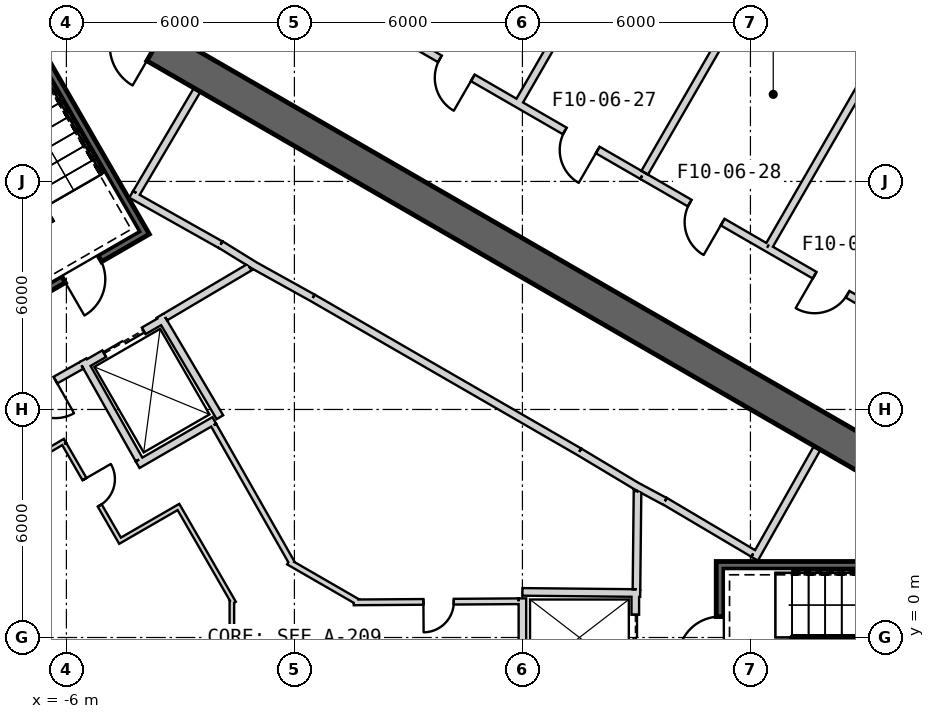
"""IFC4 building model, lengths in metres.
Left out: names, types, materials, properties, quantities, classifications, styles, units other than length and angle.
Written with IfcOpenShell. Run it as: python <this file> out.ifc"""

import sys

from ifc_helpers import new_model, si_unit, direction, frame, frame_2d, origin, place, context, subcontext, project, spatial, rectangle, extrude, element, fill, save


model = new_model("IFC4")
c1 = context("Model", 3, precision=1e-05, world=origin(), true_north=direction((0.0, 1.0)))
c2 = subcontext(c1, "Body", "Model", "MODEL_VIEW")
j1 = project(units=[si_unit("LENGTHUNIT", "METRE"), si_unit("PLANEANGLEUNIT", "RADIAN")], contexts=[c1])
p1 = place(None, origin())
s1 = spatial("IfcSite", under=j1, at=p1, CompositionType="ELEMENT")
p2 = place(p1, origin())
s2 = spatial("IfcBuilding", under=s1, at=p2, CompositionType="ELEMENT")
p3 = place(p2, frame((0.0, 0.0, 39.5)))
s3 = spatial("IfcBuildingStorey", under=s2, at=p3, CompositionType="ELEMENT", Elevation=39.5)
p4 = place(p3, frame((19.475, 2.208, 0.0), z_axis=(0.0, 0.0, 1.0), x_axis=(-0.866028369851, 0.499994862586, 0.0)))
e1 = element("IfcWall", 1, at=p4, inside=s3, PredefinedType="SHEAR", context=c2, shape_type="SweptSolid", body=[
    extrude(rectangle(XDim=31.523, YDim=0.9, at=frame_2d((15.762, 0.0))), origin(), (0.0, 0.0, 1.0), 6.0),
])
p5 = place(p4, frame((3.612, 0.0, 0.0)))
e2 = element("IfcOpeningElement", 2, at=p5, cuts=e1, PredefinedType="OPENING", context=c2, shape_type="SweptSolid", body=[
    extrude(rectangle(XDim=1.2, YDim=2.4, at=frame_2d((0.6, 1.2))), frame((0.0, 0.46, 0.0), z_axis=(0.0, -1.0, 0.0), x_axis=(1.0, 0.0, 0.0)), (0.0, 0.0, 1.0), 0.92),
])
p6 = place(p4, frame((26.712, 0.0, 0.0)))
e3 = element("IfcOpeningElement", 3, at=p6, cuts=e1, PredefinedType="OPENING", context=c2, shape_type="SweptSolid", body=[
    extrude(rectangle(XDim=1.2, YDim=2.4, at=frame_2d((0.6, 1.2))), frame((0.0, 0.46, 0.0), z_axis=(0.0, -1.0, 0.0), x_axis=(1.0, 0.0, 0.0)), (0.0, 0.0, 1.0), 0.92),
])
p7 = place(p3, frame((30.969, 12.269, 0.0), z_axis=(0.0, 0.0, 1.0), x_axis=(-0.866060590604, 0.499939049688, 0.0)))
e4 = element("IfcWall", 4, at=p7, inside=s3, PredefinedType="SOLIDWALL", context=c2, shape_type="SweptSolid", body=[
    extrude(rectangle(XDim=41.371, YDim=0.24, at=frame_2d((20.686, 0.0))), origin(), (0.0, 0.0, 1.0), 5.7),
])
p8 = place(p3, frame((7.497, 4.886, 0.0), z_axis=(0.0, 0.0, 1.0), x_axis=(-0.866030989016, 0.499990325971, 0.0)))
e5 = element("IfcWall", 5, at=p8, inside=s3, PredefinedType="PLUMBINGWALL", context=c2, shape_type="SweptSolid", body=[
    extrude(rectangle(XDim=8.1, YDim=0.2, at=frame_2d((4.05, 0.0))), origin(), (0.0, 0.0, 1.0), 5.7),
])
p9 = place(p3, frame((12.11, 2.073, 0.0), z_axis=(0.0, 0.0, 1.0), x_axis=(0.49196600604, 0.870614408852, 0.0)))
e6 = element("IfcWall", 6, at=p9, inside=s3, PredefinedType="PLUMBINGWALL", context=c2, shape_type="SweptSolid", body=[
    extrude(rectangle(XDim=3.35, YDim=0.2, at=frame_2d((1.675, 0.0))), origin(), (0.0, 0.0, 1.0), 5.7),
])
p10 = place(p3, frame((12.073, 2.211, 0.0), z_axis=(0.0, 0.0, 1.0), x_axis=(-0.860438357912, 0.509554542943, 0.0)))
e7 = element("IfcWall", 7, at=p10, inside=s3, PredefinedType="PLUMBINGWALL", context=c2, shape_type="SweptSolid", body=[
    extrude(rectangle(XDim=2.7, YDim=0.2, at=frame_2d((1.35, 0.0))), origin(), (0.0, 0.0, 1.0), 5.7),
])
p11 = place(p3, frame((9.748, 3.583, 0.0), z_axis=(0.0, 0.0, 1.0), x_axis=(-0.880917147855, 0.473270513147, 0.0)))
e8 = element("IfcWall", 8, at=p11, inside=s3, PredefinedType="PLUMBINGWALL", context=c2, shape_type="SweptSolid", body=[
    extrude(rectangle(XDim=0.878, YDim=0.2, at=frame_2d((0.439, 0.0))), origin(), (0.0, 0.0, 1.0), 5.7),
])
p12 = place(p3, frame((9.079, 3.937, 0.0), z_axis=(0.0, 0.0, 1.0), x_axis=(-0.857516281273, 0.51445682749, 0.0)))
e9 = element("IfcWall", 9, at=p12, inside=s3, PredefinedType="PLUMBINGWALL", context=c2, shape_type="SweptSolid", body=[
    extrude(rectangle(XDim=1.845, YDim=0.2, at=frame_2d((0.922, 0.0))), origin(), (0.0, 0.0, 1.0), 5.7),
])
p13 = place(p3, frame((-1.941, 10.339, 0.0), z_axis=(0.0, 0.0, 1.0), x_axis=(0.850216889117, -0.526432561171, 0.0)))
e10 = element("IfcWall", 10, at=p13, inside=s3, PredefinedType="PLUMBINGWALL", context=c2, shape_type="SweptSolid", body=[
    extrude(rectangle(XDim=1.078, YDim=0.2, at=frame_2d((0.539, 0.0))), origin(), (0.0, 0.0, 1.0), 5.7),
])
p14 = place(p3, frame((0.483, 8.936, 0.0), z_axis=(0.0, 0.0, 1.0), x_axis=(-0.874269620932, 0.485440655401, 0.0)))
e11 = element("IfcWall", 11, at=p14, inside=s3, PredefinedType="PLUMBINGWALL", context=c2, shape_type="SweptSolid", body=[
    extrude(rectangle(XDim=1.845, YDim=0.2, at=frame_2d((0.922, 0.0))), origin(), (0.0, 0.0, 1.0), 5.7),
])
p15 = place(p3, frame((-4.296, 11.659, 0.0), z_axis=(0.0, 0.0, 1.0), x_axis=(0.871534483978, -0.490334215854, 0.0)))
e12 = element("IfcWall", 12, at=p15, inside=s3, PredefinedType="PLUMBINGWALL", context=c2, shape_type="SweptSolid", body=[
    extrude(rectangle(XDim=2.7, YDim=0.2, at=frame_2d((1.35, 0.0))), origin(), (0.0, 0.0, 1.0), 5.7),
])
p16 = place(p3, frame((-4.158, 11.696, 0.0), z_axis=(0.0, 0.0, 1.0), x_axis=(0.508018930956, 0.861345903683, 0.0)))
e13 = element("IfcWall", 13, at=p16, inside=s3, PredefinedType="PLUMBINGWALL", context=c2, shape_type="SweptSolid", body=[
    extrude(rectangle(XDim=3.15, YDim=0.2, at=frame_2d((1.575, 0.0))), origin(), (0.0, 0.0, 1.0), 5.7),
])
p17 = place(p3, frame((19.2, 1.9, -0.35), z_axis=(0.0, 0.0, 1.0), x_axis=(-1.0, 0.0, 0.0)))
e14 = element("IfcWall", 14, at=p17, inside=s3, PredefinedType="SHEAR", context=c2, shape_type="SweptSolid", body=[
    extrude(rectangle(XDim=8.1, YDim=0.2, at=frame_2d((4.05, 0.0))), origin(), (0.0, 0.0, 1.0), 6.05),
])
p18 = place(p3, frame((11.2, -1.8, -0.35), z_axis=(0.0, 0.0, 1.0), x_axis=(0.0, 1.0, 0.0)))
e15 = element("IfcWall", 15, at=p18, inside=s3, PredefinedType="SHEAR", context=c2, shape_type="SweptSolid", body=[
    extrude(rectangle(XDim=3.6, YDim=0.2, at=frame_2d((1.8, 0.0))), origin(), (0.0, 0.0, 1.0), 6.05),
])
p19 = place(p18, frame((1.25, 0.0, 0.35)))
e16 = element("IfcOpeningElement", 16, at=p19, cuts=e15, PredefinedType="OPENING", context=c2, shape_type="SweptSolid", body=[
    extrude(rectangle(XDim=1.1, YDim=2.1, at=frame_2d((0.55, 1.05))), frame((0.0, 0.11, 0.0), z_axis=(0.0, -1.0, 0.0), x_axis=(1.0, 0.0, 0.0)), (0.0, 0.0, 1.0), 0.22),
])
p20 = place(p3, frame((8.97, 1.2, 0.0), z_axis=(0.0, 0.0, 1.0), x_axis=(0.0, -1.0, 0.0)))
e17 = element("IfcWall", 17, at=p20, inside=s3, PredefinedType="PLUMBINGWALL", context=c2, shape_type="SweptSolid", body=[
    extrude(rectangle(XDim=2.4, YDim=0.2, at=frame_2d((1.2, 0.0))), origin(), (0.0, 0.0, 1.0), 5.7),
])
p21 = place(p20, frame((0.6, 0.0, 0.0)))
e18 = element("IfcOpeningElement", 18, at=p21, cuts=e17, PredefinedType="OPENING", context=c2, shape_type="SweptSolid", body=[
    extrude(rectangle(XDim=1.2, YDim=2.4, at=frame_2d((0.6, 1.2))), frame((0.0, 0.11, 0.0), z_axis=(0.0, -1.0, 0.0), x_axis=(1.0, 0.0, 0.0)), (0.0, 0.0, 1.0), 0.22),
])
p22 = place(p3, frame((6.0, 1.2, 0.0), z_axis=(0.0, 0.0, 1.0), x_axis=(0.999949988, -0.010001074852, 0.0)))
e19 = element("IfcWall", 19, at=p22, inside=s3, PredefinedType="PLUMBINGWALL", context=c2, shape_type="SweptSolid", body=[
    extrude(rectangle(XDim=3.1, YDim=0.2, at=frame_2d((1.55, 0.0))), origin(), (0.0, 0.0, 1.0), 5.7),
])
p23 = place(p3, frame((6.0, -1.1, 0.0), z_axis=(0.0, 0.0, 1.0), x_axis=(0.0, 1.0, 0.0)))
e20 = element("IfcWall", 20, at=p23, inside=s3, PredefinedType="PLUMBINGWALL", context=c2, shape_type="SweptSolid", body=[
    extrude(rectangle(XDim=2.13, YDim=0.2, at=frame_2d((1.065, 0.0))), origin(), (0.0, 0.0, 1.0), 5.7),
])
p24 = place(p3, frame((-7.854, 17.405, -0.35), z_axis=(0.0, 0.0, 1.0), x_axis=(0.499997992926, -0.866026562566, 0.0)))
e21 = element("IfcWall", 21, at=p24, inside=s3, PredefinedType="SHEAR", context=c2, shape_type="SweptSolid", body=[
    extrude(rectangle(XDim=7.9, YDim=0.2, at=frame_2d((3.95, 0.0))), origin(), (0.0, 0.0, 1.0), 6.05),
])
p25 = place(p3, frame((-7.159, 8.8, -0.35), z_axis=(0.0, 0.0, 1.0), x_axis=(0.866047807691, 0.499961193289, 0.0)))
e22 = element("IfcWall", 22, at=p25, inside=s3, PredefinedType="SHEAR", context=c2, shape_type="SweptSolid", body=[
    extrude(rectangle(XDim=3.6, YDim=0.2, at=frame_2d((1.8, 0.0))), origin(), (0.0, 0.0, 1.0), 6.05),
])
p26 = place(p25, frame((1.25, 0.0, 0.35)))
e23 = element("IfcOpeningElement", 23, at=p26, cuts=e22, PredefinedType="OPENING", context=c2, shape_type="SweptSolid", body=[
    extrude(rectangle(XDim=1.1, YDim=2.1, at=frame_2d((0.55, 1.05))), frame((0.0, 0.11, 0.0), z_axis=(0.0, -1.0, 0.0), x_axis=(1.0, 0.0, 0.0)), (0.0, 0.0, 1.0), 0.22),
])
p27 = place(p3, frame((-5.524, 7.168, 0.0), z_axis=(0.0, 0.0, 1.0), x_axis=(0.866024647952, 0.500001309137, 0.0)))
e24 = element("IfcWall", 24, at=p27, inside=s3, PredefinedType="PLUMBINGWALL", context=c2, shape_type="SweptSolid", body=[
    extrude(rectangle(XDim=2.4, YDim=0.2, at=frame_2d((1.2, 0.0))), origin(), (0.0, 0.0, 1.0), 5.7),
])
p28 = place(p27, frame((0.6, 0.0, 0.0)))
e25 = element("IfcOpeningElement", 25, at=p28, cuts=e24, PredefinedType="OPENING", context=c2, shape_type="SweptSolid", body=[
    extrude(rectangle(XDim=1.2, YDim=2.4, at=frame_2d((0.6, 1.2))), frame((0.0, 0.11, 0.0), z_axis=(0.0, -1.0, 0.0), x_axis=(1.0, 0.0, 0.0)), (0.0, 0.0, 1.0), 0.22),
])
p29 = place(p3, frame((-3.538, 8.465, 0.0), z_axis=(0.0, 0.0, 1.0), x_axis=(0.508647062354, -0.860975125052, 0.0)))
e26 = element("IfcWall", 26, at=p29, inside=s3, PredefinedType="PLUMBINGWALL", context=c2, shape_type="SweptSolid", body=[
    extrude(rectangle(XDim=3.1, YDim=0.2, at=frame_2d((1.55, 0.0))), origin(), (0.0, 0.0, 1.0), 5.7),
])
p30 = place(p3, frame((-2.108, 5.711, 0.0), z_axis=(0.0, 0.0, 1.0), x_axis=(-0.866009305107, -0.50002788269, 0.0)))
e27 = element("IfcWall", 27, at=p30, inside=s3, PredefinedType="PLUMBINGWALL", context=c2, shape_type="SweptSolid", body=[
    extrude(rectangle(XDim=2.329, YDim=0.2, at=frame_2d((1.165, 0.0))), origin(), (0.0, 0.0, 1.0), 5.7),
])
p31 = place(p3, frame((-5.562, 7.296, 0.0), z_axis=(0.0, 0.0, 1.0), x_axis=(0.49134651263, -0.870964180966, 0.0)))
e28 = element("IfcWall", 28, at=p31, inside=s3, PredefinedType="PLUMBINGWALL", context=c2, shape_type="SweptSolid", body=[
    extrude(rectangle(XDim=3.0, YDim=0.2, at=frame_2d((1.5, 0.0))), origin(), (0.0, 0.0, 1.0), 5.7),
])
p32 = place(p3, frame((9.001, 1.27, 0.0), z_axis=(0.0, 0.0, 1.0), x_axis=(0.010784614026, 0.999941844359, 0.0)))
e29 = element("IfcWall", 29, at=p32, inside=s3, PredefinedType="PARTITIONING", context=c2, shape_type="SweptSolid", body=[
    extrude(rectangle(XDim=2.581, YDim=0.2, at=frame_2d((1.291, 0.0))), origin(), (0.0, 0.0, 1.0), 5.7),
])
p33 = place(p3, frame((-1.18, 9.744, 0.0), z_axis=(0.0, 0.0, 1.0), x_axis=(-0.860615607571, -0.509255118781, 0.0)))
e30 = element("IfcWall", 30, at=p33, inside=s3, PredefinedType="PARTITIONING", context=c2, shape_type="SweptSolid", body=[
    extrude(rectangle(XDim=2.581, YDim=0.2, at=frame_2d((1.29, 0.0))), origin(), (0.0, 0.0, 1.0), 5.7),
])
p34 = place(p3, frame((-5.6, 7.16, 0.0), z_axis=(0.0, 0.0, 1.0), x_axis=(-0.871363259478, -0.490638431059, 0.0)))
e31 = element("IfcWall", 31, at=p34, inside=s3, PredefinedType="PARTITIONING", context=c2, shape_type="SweptSolid", body=[
    extrude(rectangle(XDim=2.581, YDim=0.2, at=frame_2d((1.291, 0.0))), origin(), (0.0, 0.0, 1.0), 5.7),
])
p35 = place(p34, frame((0.791, 0.0, 0.0)))
e32 = element("IfcOpeningElement", 32, at=p35, cuts=e31, PredefinedType="OPENING", context=c2, shape_type="SweptSolid", body=[
    extrude(rectangle(XDim=1.0, YDim=2.1, at=frame_2d((0.5, 1.05))), frame((0.0, 0.11, 0.0), z_axis=(0.0, -1.0, 0.0), x_axis=(1.0, 0.0, 0.0)), (0.0, 0.0, 1.0), 0.22),
])
p36 = place(p3, frame((1.561, 0.924, 0.0), z_axis=(0.0, 0.0, 1.0), x_axis=(0.999976441218, 0.006864183077, 0.0)))
e33 = element("IfcWall", 33, at=p36, inside=s3, PredefinedType="PLUMBINGWALL", context=c2, shape_type="SweptSolid", body=[
    extrude(rectangle(XDim=4.339, YDim=0.15, at=frame_2d((2.169, 0.0))), origin(), (0.0, 0.0, 1.0), 5.7),
])
p37 = place(p36, frame((1.833, 0.0, 0.0)))
e34 = element("IfcOpeningElement", 34, at=p37, cuts=e33, PredefinedType="OPENING", context=c2, shape_type="SweptSolid", body=[
    extrude(rectangle(XDim=0.8, YDim=2.1, at=frame_2d((0.4, 1.05))), frame((0.0, 0.085, 0.0), z_axis=(0.0, -1.0, 0.0), x_axis=(1.0, 0.0, 0.0)), (0.0, 0.0, 1.0), 0.17),
])
p38 = place(p3, frame((-0.154, 1.989, 0.0), z_axis=(0.0, 0.0, 1.0), x_axis=(0.865992365033, -0.50005722043, 0.0)))
e35 = element("IfcWall", 35, at=p38, inside=s3, PredefinedType="PLUMBINGWALL", context=c2, shape_type="SweptSolid", body=[
    extrude(rectangle(XDim=2.104, YDim=0.15, at=frame_2d((1.052, 0.0))), origin(), (0.0, 0.0, 1.0), 5.7),
])
p39 = place(p3, frame((-2.124, 5.586, 0.0), z_axis=(0.0, 0.0, 1.0), x_axis=(0.494084527552, -0.869413871314, 0.0)))
e36 = element("IfcWall", 36, at=p39, inside=s3, PredefinedType="PLUMBINGWALL", context=c2, shape_type="SweptSolid", body=[
    extrude(rectangle(XDim=4.188, YDim=0.15, at=frame_2d((2.094, 0.0))), origin(), (0.0, 0.0, 1.0), 5.7),
])
p40 = place(p3, frame((-6.037, 5.176, 0.0), z_axis=(0.0, 0.0, 1.0), x_axis=(-0.860106072674, -0.510115225953, 0.0)))
e37 = element("IfcWall", 37, at=p40, inside=s3, PredefinedType="PARTITIONING", context=c2, shape_type="SweptSolid", body=[
    extrude(rectangle(XDim=2.225, YDim=0.12, at=frame_2d((1.112, 0.0))), origin(), (0.0, 0.0, 1.0), 5.7),
])
p41 = place(p3, frame((-4.558, 2.495, 0.0), z_axis=(0.0, 0.0, 1.0), x_axis=(-0.499990139034, 0.866031096941, 0.0)))
e38 = element("IfcWall", 38, at=p41, inside=s3, PredefinedType="PARTITIONING", context=c2, shape_type="SweptSolid", body=[
    extrude(rectangle(XDim=3.0, YDim=0.12, at=frame_2d((1.5, 0.0))), origin(), (0.0, 0.0, 1.0), 5.7),
])
p42 = place(p41, frame((1.13, 0.0, 0.0)))
e39 = element("IfcOpeningElement", 39, at=p42, cuts=e38, PredefinedType="OPENING", context=c2, shape_type="SweptSolid", body=[
    extrude(rectangle(XDim=0.8, YDim=2.1, at=frame_2d((0.4, 1.05))), frame((0.0, 0.07, 0.0), z_axis=(0.0, -1.0, 0.0), x_axis=(1.0, 0.0, 0.0)), (0.0, 0.0, 1.0), 0.14),
])
p43 = place(p3, frame((-2.999, 3.465, 0.0), z_axis=(0.0, 0.0, 1.0), x_axis=(-0.866059624469, -0.499940723351, 0.0)))
e40 = element("IfcWall", 40, at=p43, inside=s3, PredefinedType="PARTITIONING", context=c2, shape_type="SweptSolid", body=[
    extrude(rectangle(XDim=1.775, YDim=0.12, at=frame_2d((0.888, 0.0))), origin(), (0.0, 0.0, 1.0), 5.7),
])
p44 = place(p3, frame((-1.594, 0.91, 0.0), z_axis=(0.0, 0.0, 1.0), x_axis=(-0.49997412077, 0.866040344649, 0.0)))
e41 = element("IfcWall", 41, at=p44, inside=s3, PredefinedType="PARTITIONING", context=c2, shape_type="SweptSolid", body=[
    extrude(rectangle(XDim=2.855, YDim=0.12, at=frame_2d((1.428, 0.0))), origin(), (0.0, 0.0, 1.0), 5.7),
])
p45 = place(p3, frame((-1.646, -1.104, 0.0), z_axis=(0.0, 0.0, 1.0), x_axis=(0.0, 1.0, 0.0)))
e42 = element("IfcWall", 42, at=p45, inside=s3, PredefinedType="PARTITIONING", context=c2, shape_type="SweptSolid", body=[
    extrude(rectangle(XDim=2.085, YDim=0.12, at=frame_2d((1.043, 0.0))), origin(), (0.0, 0.0, 1.0), 5.7),
])
p46 = place(p3, frame((15.725, 8.357, 0.0), z_axis=(0.0, 0.0, 1.0), x_axis=(-0.866037770685, 0.499978579288, 0.0)))
e43 = element("IfcWall", 43, at=p46, inside=s3, PredefinedType="PARTITIONING", context=c2, shape_type="SweptSolid", body=[
    extrude(rectangle(XDim=3.796, YDim=0.2, at=frame_2d((1.898, 0.0))), origin(), (0.0, 0.0, 1.0), 4.88),
])
p47 = place(p46, frame((1.35, 0.0, 0.0)))
e44 = element("IfcOpeningElement", 44, at=p47, cuts=e43, PredefinedType="OPENING", context=c2, shape_type="SweptSolid", body=[
    extrude(rectangle(XDim=1.0, YDim=2.1, at=frame_2d((0.5, 1.05))), frame((0.0, 0.11, 0.0), z_axis=(0.0, -1.0, 0.0), x_axis=(1.0, 0.0, 0.0)), (0.0, 0.0, 1.0), 0.22),
])
p48 = place(p3, frame((12.438, 10.255, 0.0), z_axis=(0.0, 0.0, 1.0), x_axis=(-0.866009918585, 0.500026820193, 0.0)))
e45 = element("IfcWall", 45, at=p48, inside=s3, PredefinedType="PARTITIONING", context=c2, shape_type="SweptSolid", body=[
    extrude(rectangle(XDim=3.796, YDim=0.2, at=frame_2d((1.898, 0.0))), origin(), (0.0, 0.0, 1.0), 4.98),
])
p49 = place(p48, frame((1.35, 0.0, 0.0)))
e46 = element("IfcOpeningElement", 46, at=p49, cuts=e45, PredefinedType="OPENING", context=c2, shape_type="SweptSolid", body=[
    extrude(rectangle(XDim=1.0, YDim=2.1, at=frame_2d((0.5, 1.05))), frame((0.0, 0.11, 0.0), z_axis=(0.0, -1.0, 0.0), x_axis=(1.0, 0.0, 0.0)), (0.0, 0.0, 1.0), 0.22),
])
p50 = place(p3, frame((9.15, 12.153, 0.0), z_axis=(0.0, 0.0, 1.0), x_axis=(-0.866026268399, 0.49999850244, 0.0)))
e47 = element("IfcWall", 47, at=p50, inside=s3, PredefinedType="PARTITIONING", context=c2, shape_type="SweptSolid", body=[
    extrude(rectangle(XDim=7.579, YDim=0.2, at=frame_2d((3.79, 0.0))), origin(), (0.0, 0.0, 1.0), 4.98),
])
p51 = place(p50, frame((5.146, 0.0, 0.0)))
e48 = element("IfcOpeningElement", 48, at=p51, cuts=e47, PredefinedType="OPENING", context=c2, shape_type="SweptSolid", body=[
    extrude(rectangle(XDim=1.0, YDim=2.1, at=frame_2d((0.5, 1.05))), frame((0.0, 0.11, 0.0), z_axis=(0.0, -1.0, 0.0), x_axis=(1.0, 0.0, 0.0)), (0.0, 0.0, 1.0), 0.22),
])
p52 = place(p50, frame((1.35, 0.0, 0.0)))
e49 = element("IfcOpeningElement", 49, at=p52, cuts=e47, PredefinedType="OPENING", context=c2, shape_type="SweptSolid", body=[
    extrude(rectangle(XDim=1.0, YDim=2.1, at=frame_2d((0.5, 1.05))), frame((0.0, 0.11, 0.0), z_axis=(0.0, -1.0, 0.0), x_axis=(1.0, 0.0, 0.0)), (0.0, 0.0, 1.0), 0.22),
])
p53 = place(p3, frame((9.407, 20.149, 0.0), z_axis=(0.0, 0.0, 1.0), x_axis=(-0.500002060787, -0.866024213985, 0.0)))
e50 = element("IfcWall", 50, at=p53, inside=s3, PredefinedType="PARTITIONING", context=c2, shape_type="SweptSolid", body=[
    extrude(rectangle(XDim=6.954, YDim=0.2, at=frame_2d((3.477, 0.0))), origin(), (0.0, 0.0, 1.0), 5.7),
])
p54 = place(p3, frame((9.218, 12.23, 0.0), z_axis=(0.0, 0.0, 1.0), x_axis=(0.500017264306, 0.866015436003, 0.0)))
e51 = element("IfcWall", 51, at=p54, inside=s3, PredefinedType="PARTITIONING", context=c2, shape_type="SweptSolid", body=[
    extrude(rectangle(XDim=6.953, YDim=0.2, at=frame_2d((3.477, 0.0))), origin(), (0.0, 0.0, 1.0), 5.7),
])
p55 = place(p3, frame((15.981, 16.354, 0.0), z_axis=(0.0, 0.0, 1.0), x_axis=(-0.499990930889, -0.866030639775, 0.0)))
e52 = element("IfcWall", 52, at=p55, inside=s3, PredefinedType="PARTITIONING", context=c2, shape_type="SweptSolid", body=[
    extrude(rectangle(XDim=6.953, YDim=0.2, at=frame_2d((3.477, 0.0))), origin(), (0.0, 0.0, 1.0), 4.98),
])
p56 = place(p19, origin())
e53 = element("IfcDoor", 53, at=p56, inside=s3, OperationType="SINGLE_SWING_LEFT", PredefinedType="USERDEFINED", context=c2, shape_type="SweptSolid", body=[
    extrude(rectangle(XDim=1.1, YDim=2.1, at=frame_2d((0.55, 1.05))), frame((0.0, 0.025, 0.0), z_axis=(0.0, -1.0, 0.0), x_axis=(1.0, 0.0, 0.0)), (0.0, 0.0, 1.0), 0.05),
])
fill(e16, e53)
p57 = place(p21, origin())
e54 = element("IfcDoor", 54, at=p57, inside=s3, OperationType="SLIDING_TO_LEFT", PredefinedType="USERDEFINED", context=c2, shape_type="SweptSolid", body=[
    extrude(rectangle(XDim=1.2, YDim=2.4, at=frame_2d((0.6, 1.2))), frame((0.0, 0.025, 0.0), z_axis=(0.0, -1.0, 0.0), x_axis=(1.0, 0.0, 0.0)), (0.0, 0.0, 1.0), 0.05),
])
fill(e18, e54)
p58 = place(p26, origin())
e55 = element("IfcDoor", 55, at=p58, inside=s3, OperationType="SINGLE_SWING_LEFT", PredefinedType="USERDEFINED", context=c2, shape_type="SweptSolid", body=[
    extrude(rectangle(XDim=1.1, YDim=2.1, at=frame_2d((0.55, 1.05))), frame((0.0, 0.025, 0.0), z_axis=(0.0, -1.0, 0.0), x_axis=(1.0, 0.0, 0.0)), (0.0, 0.0, 1.0), 0.05),
])
fill(e23, e55)
p59 = place(p35, origin())
e56 = element("IfcDoor", 56, at=p59, inside=s3, OperationType="SINGLE_SWING_LEFT", PredefinedType="USERDEFINED", context=c2, shape_type="SweptSolid", body=[
    extrude(rectangle(XDim=1.0, YDim=2.1, at=frame_2d((0.5, 1.05))), frame((0.0, 0.025, 0.0), z_axis=(0.0, -1.0, 0.0), x_axis=(1.0, 0.0, 0.0)), (0.0, 0.0, 1.0), 0.05),
])
fill(e32, e56)
p60 = place(p28, origin())
e57 = element("IfcDoor", 57, at=p60, inside=s3, OperationType="SLIDING_TO_LEFT", PredefinedType="USERDEFINED", context=c2, shape_type="SweptSolid", body=[
    extrude(rectangle(XDim=1.2, YDim=2.4, at=frame_2d((0.6, 1.2))), frame((0.0, 0.025, 0.0), z_axis=(0.0, -1.0, 0.0), x_axis=(1.0, 0.0, 0.0)), (0.0, 0.0, 1.0), 0.05),
])
fill(e25, e57)
p61 = place(p37, origin())
e58 = element("IfcDoor", 58, at=p61, inside=s3, OperationType="SINGLE_SWING_LEFT", PredefinedType="USERDEFINED", context=c2, shape_type="SweptSolid", body=[
    extrude(rectangle(XDim=0.8, YDim=2.1, at=frame_2d((0.4, 1.05))), frame((0.0, 0.025, 0.0), z_axis=(0.0, -1.0, 0.0), x_axis=(1.0, 0.0, 0.0)), (0.0, 0.0, 1.0), 0.05),
])
fill(e34, e58)
p62 = place(p42, origin())
e59 = element("IfcDoor", 59, at=p62, inside=s3, OperationType="SINGLE_SWING_RIGHT", PredefinedType="USERDEFINED", context=c2, shape_type="SweptSolid", body=[
    extrude(rectangle(XDim=0.8, YDim=2.1, at=frame_2d((0.4, 1.05))), frame((0.0, 0.025, 0.0), z_axis=(0.0, -1.0, 0.0), x_axis=(1.0, 0.0, 0.0)), (0.0, 0.0, 1.0), 0.05),
])
fill(e39, e59)
p63 = place(p51, origin())
e60 = element("IfcDoor", 60, at=p63, inside=s3, OperationType="SINGLE_SWING_LEFT", PredefinedType="USERDEFINED", context=c2, shape_type="SweptSolid", body=[
    extrude(rectangle(XDim=1.0, YDim=2.1, at=frame_2d((0.5, 1.05))), frame((0.0, 0.025, 0.0), z_axis=(0.0, -1.0, 0.0), x_axis=(1.0, 0.0, 0.0)), (0.0, 0.0, 1.0), 0.05),
])
fill(e48, e60)
p64 = place(p52, origin())
e61 = element("IfcDoor", 61, at=p64, inside=s3, OperationType="SINGLE_SWING_LEFT", PredefinedType="USERDEFINED", context=c2, shape_type="SweptSolid", body=[
    extrude(rectangle(XDim=1.0, YDim=2.1, at=frame_2d((0.5, 1.05))), frame((0.0, 0.025, 0.0), z_axis=(0.0, -1.0, 0.0), x_axis=(1.0, 0.0, 0.0)), (0.0, 0.0, 1.0), 0.05),
])
fill(e49, e61)
p65 = place(p49, origin())
e62 = element("IfcDoor", 62, at=p65, inside=s3, OperationType="SINGLE_SWING_LEFT", PredefinedType="USERDEFINED", context=c2, shape_type="SweptSolid", body=[
    extrude(rectangle(XDim=1.0, YDim=2.1, at=frame_2d((0.5, 1.05))), frame((0.0, 0.025, 0.0), z_axis=(0.0, -1.0, 0.0), x_axis=(1.0, 0.0, 0.0)), (0.0, 0.0, 1.0), 0.05),
])
fill(e46, e62)
p66 = place(p47, origin())
e63 = element("IfcDoor", 63, at=p66, inside=s3, OperationType="SINGLE_SWING_RIGHT", PredefinedType="USERDEFINED", context=c2, shape_type="SweptSolid", body=[
    extrude(rectangle(XDim=1.0, YDim=2.1, at=frame_2d((0.5, 1.05))), frame((0.0, 0.025, 0.0), z_axis=(0.0, -1.0, 0.0), x_axis=(1.0, 0.0, 0.0)), (0.0, 0.0, 1.0), 0.05),
])
fill(e44, e63)
save(model, sys.argv[1])
